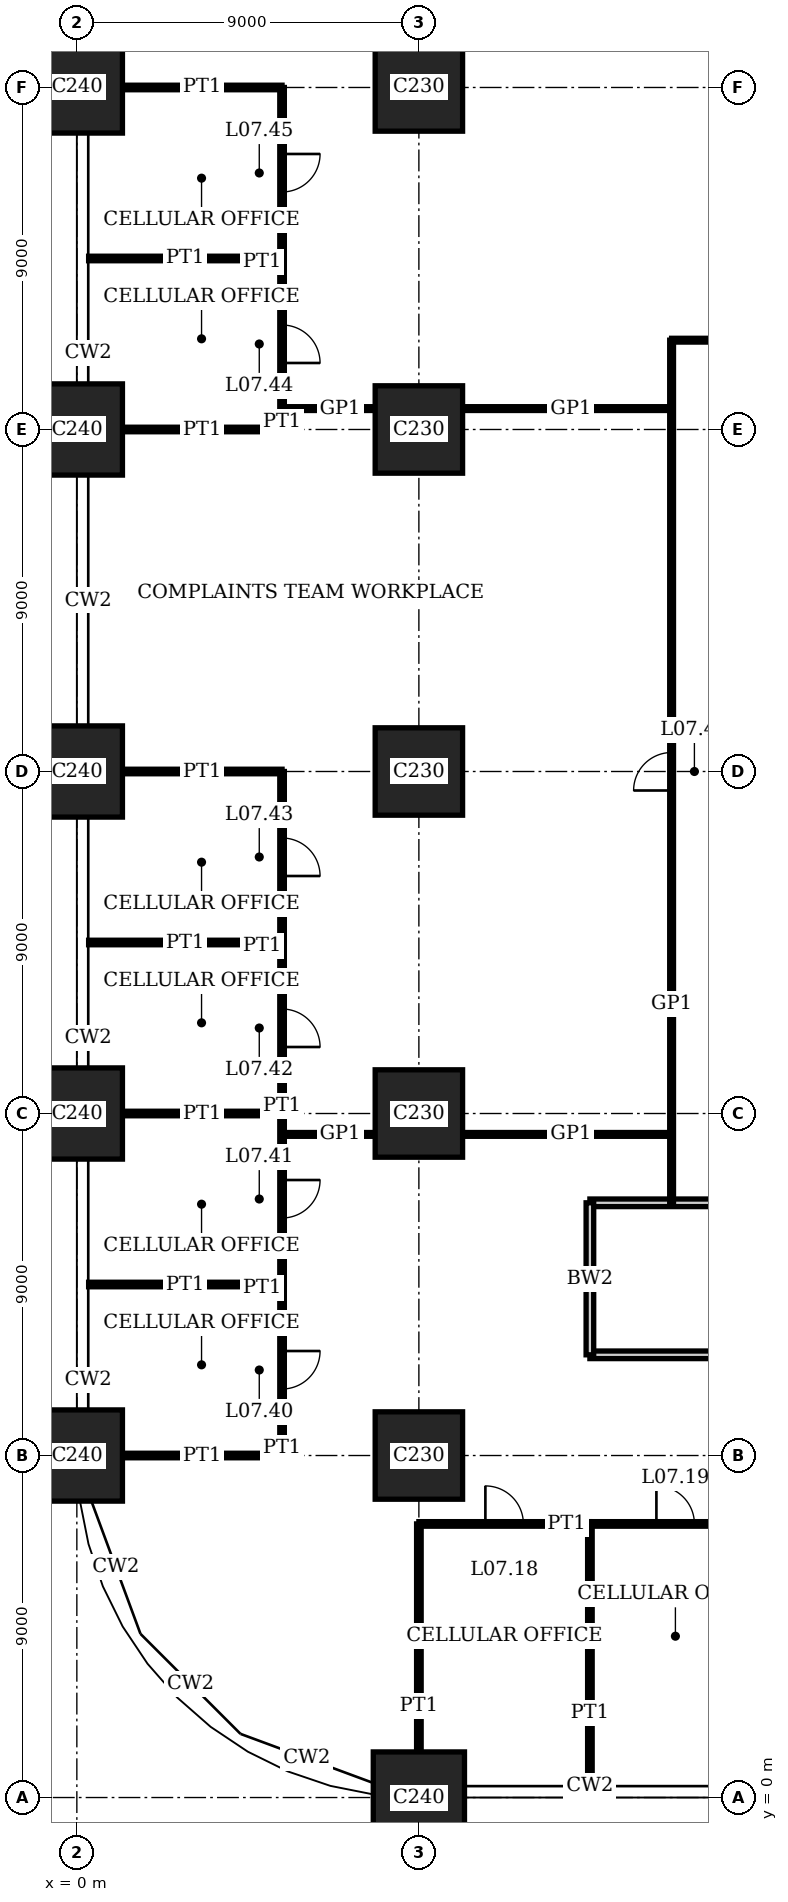
"""IFC4 building model, lengths in metres.
Left out: names, types, materials, properties, quantities, classifications, styles, units other than length and angle.
Written with IfcOpenShell. Run it as: python <this file> out.ifc"""

import sys

from ifc_helpers import new_model, si_unit, direction, frame, frame_2d, origin, origin_2d, place, context, subcontext, project, spatial, rectangle, extrude, element, fill, save


model = new_model("IFC4")
c1 = context("Model", 3, precision=1e-05, world=origin(), true_north=direction((0.0, 1.0)))
c2 = subcontext(c1, "Body", "Model", "MODEL_VIEW")
j1 = project(units=[si_unit("LENGTHUNIT", "METRE"), si_unit("PLANEANGLEUNIT", "RADIAN")], contexts=[c1])
p1 = place(None, origin())
s1 = spatial("IfcSite", under=j1, at=p1, CompositionType="ELEMENT")
p2 = place(p1, origin())
s2 = spatial("IfcBuilding", under=s1, at=p2, CompositionType="ELEMENT")
p3 = place(p2, frame((0.0, 0.0, 31.8)))
s3 = spatial("IfcBuildingStorey", under=s2, at=p3, CompositionType="ELEMENT", Elevation=31.8)
for number, where, z_axis, x_axis in (
    (1, (0.0, 9.0, 0.0), (0.0, 0.0, 1.0), (1.0, 0.0, 0.0)),
    (2, (0.0, 18.0, 0.0), (0.0, 0.0, 1.0), (1.0, 0.0, 0.0)),
    (3, (0.0, 27.0, 0.0), (0.0, 0.0, 1.0), (1.0, 0.0, 0.0)),
    (4, (0.0, 36.0, 0.0), (0.0, 0.0, 1.0), (1.0, 0.0, 0.0)),
    (5, (0.0, 45.0, 0.0), (0.0, 0.0, 1.0), (1.0, 0.0, 0.0)),
    (6, (9.0, 0.0, 0.0), (0.0, 0.0, 1.0), (1.0, 0.0, 0.0)),
):
    element("IfcColumn", number, at=place(p3, frame(where, z_axis=z_axis, x_axis=x_axis)), inside=s3, PredefinedType="COLUMN", context=c2, shape_type="SweptSolid", body=[
        extrude(rectangle(XDim=2.4, YDim=2.4, at=origin_2d()), origin(), (0.0, 0.0, 1.0), 4.0),
    ])
for number, where, z_axis, x_axis in (
    (7, (9.0, 9.0, 0.0), (0.0, 0.0, 1.0), (1.0, 0.0, 0.0)),
    (8, (9.0, 18.0, 0.0), (0.0, 0.0, 1.0), (1.0, 0.0, 0.0)),
    (9, (9.0, 27.0, 0.0), (0.0, 0.0, 1.0), (1.0, 0.0, 0.0)),
    (10, (9.0, 36.0, 0.0), (0.0, 0.0, 1.0), (1.0, 0.0, 0.0)),
    (11, (9.0, 45.0, 0.0), (0.0, 0.0, 1.0), (1.0, 0.0, 0.0)),
):
    element("IfcColumn", number, at=place(p3, frame(where, z_axis=z_axis, x_axis=x_axis)), inside=s3, PredefinedType="COLUMN", context=c2, shape_type="SweptSolid", body=[
        extrude(rectangle(XDim=2.3, YDim=2.3, at=origin_2d()), origin(), (0.0, 0.0, 1.0), 4.0),
    ])
p4 = place(p3, frame((9.0, 7.2, 0.0), z_axis=(0.0, 0.0, 1.0), x_axis=(1.0, 0.0, 0.0)))
e12 = element("IfcWall", 12, at=p4, inside=s3, PredefinedType="PARTITIONING", context=c2, shape_type="SweptSolid", body=[
    extrude(rectangle(XDim=4.5, YDim=0.12, at=frame_2d((2.25, 0.0))), origin(), (0.0, 0.0, 1.0), 3.75),
])
p5 = place(p4, frame((1.75, 0.0, 0.0)))
e13 = element("IfcOpeningElement", 13, at=p5, cuts=e12, PredefinedType="OPENING", context=c2, shape_type="SweptSolid", body=[
    extrude(rectangle(XDim=1.0, YDim=2.4, at=frame_2d((0.5, 1.2))), frame((0.0, 0.07, 0.0), z_axis=(0.0, -1.0, 0.0), x_axis=(1.0, 0.0, 0.0)), (0.0, 0.0, 1.0), 0.14),
])
p6 = place(p3, frame((13.5, 7.2, 0.0), z_axis=(0.0, 0.0, 1.0), x_axis=(1.0, 0.0, 0.0)))
e14 = element("IfcWall", 14, at=p6, inside=s3, PredefinedType="PARTITIONING", context=c2, shape_type="SweptSolid", body=[
    extrude(rectangle(XDim=4.5, YDim=0.12, at=frame_2d((2.25, 0.0))), origin(), (0.0, 0.0, 1.0), 3.75),
])
p7 = place(p6, frame((1.75, 0.0, 0.0)))
e15 = element("IfcOpeningElement", 15, at=p7, cuts=e14, PredefinedType="OPENING", context=c2, shape_type="SweptSolid", body=[
    extrude(rectangle(XDim=1.0, YDim=2.4, at=frame_2d((0.5, 1.2))), frame((0.0, 0.07, 0.0), z_axis=(0.0, -1.0, 0.0), x_axis=(1.0, 0.0, 0.0)), (0.0, 0.0, 1.0), 0.14),
])
p8 = place(p3, frame((1.2, 9.0, 0.0), z_axis=(0.0, 0.0, 1.0), x_axis=(1.0, 0.0, 0.0)))
e16 = element("IfcWall", 16, at=p8, inside=s3, PredefinedType="PARTITIONING", context=c2, shape_type="SweptSolid", body=[
    extrude(rectangle(XDim=4.2, YDim=0.12, at=frame_2d((2.1, 0.0))), origin(), (0.0, 0.0, 1.0), 3.05),
])
p9 = place(p3, frame((13.5, 11.65, 0.0), z_axis=(0.0, 0.0, 1.0), x_axis=(1.0, 0.0, 0.0)))
e17 = element("IfcWall", 17, at=p9, inside=s3, PredefinedType="SOLIDWALL", context=c2, shape_type="SweptSolid", body=[
    extrude(rectangle(XDim=9.0, YDim=0.2, at=frame_2d((4.5, 0.0))), origin(), (0.0, 0.0, 1.0), 3.75),
])
p10 = place(p9, frame((4.0, 0.0, 0.0)))
e18 = element("IfcOpeningElement", 18, at=p10, cuts=e17, PredefinedType="OPENING", context=c2, shape_type="SweptSolid", body=[
    extrude(rectangle(XDim=1.0, YDim=2.4, at=frame_2d((0.5, 1.2))), frame((0.0, 0.11, 0.0), z_axis=(0.0, -1.0, 0.0), x_axis=(1.0, 0.0, 0.0)), (0.0, 0.0, 1.0), 0.22),
])
p11 = place(p3, frame((0.31, 13.5, 0.0), z_axis=(0.0, 0.0, 1.0), x_axis=(1.0, 0.0, 0.0)))
e19 = element("IfcWall", 19, at=p11, inside=s3, PredefinedType="PARTITIONING", context=c2, shape_type="SweptSolid", body=[
    extrude(rectangle(XDim=5.09, YDim=0.12, at=frame_2d((2.545, 0.0))), origin(), (0.0, 0.0, 1.0), 3.1),
])
p12 = place(p3, frame((13.5, 15.65, 0.0), z_axis=(0.0, 0.0, 1.0), x_axis=(1.0, 0.0, 0.0)))
e20 = element("IfcWall", 20, at=p12, inside=s3, PredefinedType="SOLIDWALL", context=c2, shape_type="SweptSolid", body=[
    extrude(rectangle(XDim=9.0, YDim=0.2, at=frame_2d((4.5, 0.0))), origin(), (0.0, 0.0, 1.0), 3.75),
])
p13 = place(p3, frame((5.39, 17.45, 0.0), z_axis=(0.0, 0.0, 1.0), x_axis=(1.0, 0.0, 0.0)))
e21 = element("IfcWall", 21, at=p13, inside=s3, PredefinedType="PARTITIONING", context=c2, shape_type="SweptSolid", body=[
    extrude(rectangle(XDim=2.46, YDim=0.1, at=frame_2d((1.23, 0.0))), origin(), (0.0, 0.0, 1.0), 3.75),
])
p14 = place(p3, frame((10.15, 17.45, 0.0), z_axis=(0.0, 0.0, 1.0), x_axis=(1.0, 0.0, 0.0)))
e22 = element("IfcWall", 22, at=p14, inside=s3, PredefinedType="PARTITIONING", context=c2, shape_type="SweptSolid", body=[
    extrude(rectangle(XDim=5.5, YDim=0.1, at=frame_2d((2.75, 0.0))), origin(), (0.0, 0.0, 1.0), 3.75),
])
p15 = place(p3, frame((1.2, 18.0, 0.0), z_axis=(0.0, 0.0, 1.0), x_axis=(1.0, 0.0, 0.0)))
e23 = element("IfcWall", 23, at=p15, inside=s3, PredefinedType="PARTITIONING", context=c2, shape_type="SweptSolid", body=[
    extrude(rectangle(XDim=4.2, YDim=0.12, at=frame_2d((2.1, 0.0))), origin(), (0.0, 0.0, 1.0), 3.05),
])
p16 = place(p3, frame((0.31, 22.5, 0.0), z_axis=(0.0, 0.0, 1.0), x_axis=(1.0, 0.0, 0.0)))
e24 = element("IfcWall", 24, at=p16, inside=s3, PredefinedType="PARTITIONING", context=c2, shape_type="SweptSolid", body=[
    extrude(rectangle(XDim=5.09, YDim=0.12, at=frame_2d((2.545, 0.0))), origin(), (0.0, 0.0, 1.0), 3.1),
])
for number, where, z_axis, x_axis in (
    (25, (1.2, 27.0, 0.0), (0.0, 0.0, 1.0), (1.0, 0.0, 0.0)),
    (26, (1.2, 36.0, 0.0), (0.0, 0.0, 1.0), (1.0, 0.0, 0.0)),
):
    element("IfcWall", number, at=place(p3, frame(where, z_axis=z_axis, x_axis=x_axis)), inside=s3, PredefinedType="PARTITIONING", context=c2, shape_type="SweptSolid", body=[
        extrude(rectangle(XDim=4.2, YDim=0.12, at=frame_2d((2.1, 0.0))), origin(), (0.0, 0.0, 1.0), 3.05),
    ])
p17 = place(p3, frame((5.39, 36.55, 0.0), z_axis=(0.0, 0.0, 1.0), x_axis=(1.0, 0.0, 0.0)))
e27 = element("IfcWall", 27, at=p17, inside=s3, PredefinedType="PARTITIONING", context=c2, shape_type="SweptSolid", body=[
    extrude(rectangle(XDim=2.46, YDim=0.1, at=frame_2d((1.23, 0.0))), origin(), (0.0, 0.0, 1.0), 3.75),
])
p18 = place(p3, frame((10.15, 36.55, 0.0), z_axis=(0.0, 0.0, 1.0), x_axis=(1.0, 0.0, 0.0)))
e28 = element("IfcWall", 28, at=p18, inside=s3, PredefinedType="PARTITIONING", context=c2, shape_type="SweptSolid", body=[
    extrude(rectangle(XDim=5.5, YDim=0.1, at=frame_2d((2.75, 0.0))), origin(), (0.0, 0.0, 1.0), 3.75),
])
p19 = place(p3, frame((15.65, 38.35, 0.0), z_axis=(0.0, 0.0, 1.0), x_axis=(1.0, 0.0, 0.0)))
e29 = element("IfcWall", 29, at=p19, inside=s3, PredefinedType="PARTITIONING", context=c2, shape_type="SweptSolid", body=[
    extrude(rectangle(XDim=24.85, YDim=0.1, at=frame_2d((12.425, 0.0))), origin(), (0.0, 0.0, 1.0), 3.75),
])
p20 = place(p19, frame((11.925, 0.0, 0.0)))
e30 = element("IfcOpeningElement", 30, at=p20, cuts=e29, PredefinedType="OPENING", context=c2, shape_type="SweptSolid", body=[
    extrude(rectangle(XDim=1.0, YDim=2.4, at=frame_2d((0.5, 1.2))), frame((0.0, 0.06, 0.0), z_axis=(0.0, -1.0, 0.0), x_axis=(1.0, 0.0, 0.0)), (0.0, 0.0, 1.0), 0.12),
])
p21 = place(p3, frame((0.31, 40.5, 0.0), z_axis=(0.0, 0.0, 1.0), x_axis=(1.0, 0.0, 0.0)))
e31 = element("IfcWall", 31, at=p21, inside=s3, PredefinedType="PARTITIONING", context=c2, shape_type="SweptSolid", body=[
    extrude(rectangle(XDim=5.09, YDim=0.12, at=frame_2d((2.545, 0.0))), origin(), (0.0, 0.0, 1.0), 3.1),
])
p22 = place(p3, frame((1.2, 45.0, 0.0), z_axis=(0.0, 0.0, 1.0), x_axis=(1.0, 0.0, 0.0)))
e32 = element("IfcWall", 32, at=p22, inside=s3, PredefinedType="PARTITIONING", context=c2, shape_type="SweptSolid", body=[
    extrude(rectangle(XDim=4.2, YDim=0.12, at=frame_2d((2.1, 0.0))), origin(), (0.0, 0.0, 1.0), 3.05),
])
p23 = place(p3, frame((5.4, 9.0, 0.0), z_axis=(0.0, 0.0, 1.0), x_axis=(0.0, 1.0, 0.0)))
e33 = element("IfcWall", 33, at=p23, inside=s3, PredefinedType="PARTITIONING", context=c2, shape_type="SweptSolid", body=[
    extrude(rectangle(XDim=4.5, YDim=0.12, at=frame_2d((2.25, 0.0))), origin(), (0.0, 0.0, 1.0), 3.75),
])
p24 = place(p23, frame((1.75, 0.0, 0.0)))
e34 = element("IfcOpeningElement", 34, at=p24, cuts=e33, PredefinedType="OPENING", context=c2, shape_type="SweptSolid", body=[
    extrude(rectangle(XDim=1.0, YDim=2.4, at=frame_2d((0.5, 1.2))), frame((0.0, 0.07, 0.0), z_axis=(0.0, -1.0, 0.0), x_axis=(1.0, 0.0, 0.0)), (0.0, 0.0, 1.0), 0.14),
])
p25 = place(p3, frame((5.4, 13.5, 0.0), z_axis=(0.0, 0.0, 1.0), x_axis=(0.0, 1.0, 0.0)))
e35 = element("IfcWall", 35, at=p25, inside=s3, PredefinedType="PARTITIONING", context=c2, shape_type="SweptSolid", body=[
    extrude(rectangle(XDim=4.5, YDim=0.12, at=frame_2d((2.25, 0.0))), origin(), (0.0, 0.0, 1.0), 3.75),
])
p26 = place(p25, frame((1.75, 0.0, 0.0)))
e36 = element("IfcOpeningElement", 36, at=p26, cuts=e35, PredefinedType="OPENING", context=c2, shape_type="SweptSolid", body=[
    extrude(rectangle(XDim=1.0, YDim=2.4, at=frame_2d((0.5, 1.2))), frame((0.0, 0.07, 0.0), z_axis=(0.0, -1.0, 0.0), x_axis=(1.0, 0.0, 0.0)), (0.0, 0.0, 1.0), 0.14),
])
p27 = place(p3, frame((5.4, 18.0, 0.0), z_axis=(0.0, 0.0, 1.0), x_axis=(0.0, 1.0, 0.0)))
e37 = element("IfcWall", 37, at=p27, inside=s3, PredefinedType="PARTITIONING", context=c2, shape_type="SweptSolid", body=[
    extrude(rectangle(XDim=4.5, YDim=0.12, at=frame_2d((2.25, 0.0))), origin(), (0.0, 0.0, 1.0), 3.75),
])
p28 = place(p27, frame((1.75, 0.0, 0.0)))
e38 = element("IfcOpeningElement", 38, at=p28, cuts=e37, PredefinedType="OPENING", context=c2, shape_type="SweptSolid", body=[
    extrude(rectangle(XDim=1.0, YDim=2.4, at=frame_2d((0.5, 1.2))), frame((0.0, 0.07, 0.0), z_axis=(0.0, -1.0, 0.0), x_axis=(1.0, 0.0, 0.0)), (0.0, 0.0, 1.0), 0.14),
])
p29 = place(p3, frame((5.4, 22.5, 0.0), z_axis=(0.0, 0.0, 1.0), x_axis=(0.0, 1.0, 0.0)))
e39 = element("IfcWall", 39, at=p29, inside=s3, PredefinedType="PARTITIONING", context=c2, shape_type="SweptSolid", body=[
    extrude(rectangle(XDim=4.5, YDim=0.12, at=frame_2d((2.25, 0.0))), origin(), (0.0, 0.0, 1.0), 3.75),
])
p30 = place(p29, frame((1.75, 0.0, 0.0)))
e40 = element("IfcOpeningElement", 40, at=p30, cuts=e39, PredefinedType="OPENING", context=c2, shape_type="SweptSolid", body=[
    extrude(rectangle(XDim=1.0, YDim=2.4, at=frame_2d((0.5, 1.2))), frame((0.0, 0.07, 0.0), z_axis=(0.0, -1.0, 0.0), x_axis=(1.0, 0.0, 0.0)), (0.0, 0.0, 1.0), 0.14),
])
p31 = place(p3, frame((5.4, 36.0, 0.0), z_axis=(0.0, 0.0, 1.0), x_axis=(0.0, 1.0, 0.0)))
e41 = element("IfcWall", 41, at=p31, inside=s3, PredefinedType="PARTITIONING", context=c2, shape_type="SweptSolid", body=[
    extrude(rectangle(XDim=4.5, YDim=0.12, at=frame_2d((2.25, 0.0))), origin(), (0.0, 0.0, 1.0), 3.75),
])
p32 = place(p31, frame((1.75, 0.0, 0.0)))
e42 = element("IfcOpeningElement", 42, at=p32, cuts=e41, PredefinedType="OPENING", context=c2, shape_type="SweptSolid", body=[
    extrude(rectangle(XDim=1.0, YDim=2.4, at=frame_2d((0.5, 1.2))), frame((0.0, 0.07, 0.0), z_axis=(0.0, -1.0, 0.0), x_axis=(1.0, 0.0, 0.0)), (0.0, 0.0, 1.0), 0.14),
])
p33 = place(p3, frame((5.4, 40.5, 0.0), z_axis=(0.0, 0.0, 1.0), x_axis=(0.0, 1.0, 0.0)))
e43 = element("IfcWall", 43, at=p33, inside=s3, PredefinedType="PARTITIONING", context=c2, shape_type="SweptSolid", body=[
    extrude(rectangle(XDim=4.5, YDim=0.12, at=frame_2d((2.25, 0.0))), origin(), (0.0, 0.0, 1.0), 3.75),
])
p34 = place(p33, frame((1.75, 0.0, 0.0)))
e44 = element("IfcOpeningElement", 44, at=p34, cuts=e43, PredefinedType="OPENING", context=c2, shape_type="SweptSolid", body=[
    extrude(rectangle(XDim=1.0, YDim=2.4, at=frame_2d((0.5, 1.2))), frame((0.0, 0.07, 0.0), z_axis=(0.0, -1.0, 0.0), x_axis=(1.0, 0.0, 0.0)), (0.0, 0.0, 1.0), 0.14),
])
p35 = place(p3, frame((9.0, 1.2, 0.0), z_axis=(0.0, 0.0, 1.0), x_axis=(0.0, 1.0, 0.0)))
e45 = element("IfcWall", 45, at=p35, inside=s3, PredefinedType="PARTITIONING", context=c2, shape_type="SweptSolid", body=[
    extrude(rectangle(XDim=6.0, YDim=0.12, at=frame_2d((3.0, 0.0))), origin(), (0.0, 0.0, 1.0), 3.05),
])
p36 = place(p3, frame((13.5, 11.65, 0.0), z_axis=(0.0, 0.0, 1.0), x_axis=(0.0, 1.0, 0.0)))
e46 = element("IfcWall", 46, at=p36, inside=s3, PredefinedType="SOLIDWALL", context=c2, shape_type="SweptSolid", body=[
    extrude(rectangle(XDim=4.0, YDim=0.2, at=frame_2d((2.0, 0.0))), origin(), (0.0, 0.0, 1.0), 3.75),
])
p37 = place(p3, frame((13.5, 0.31, 0.0), z_axis=(0.0, 0.0, 1.0), x_axis=(0.0, 1.0, 0.0)))
e47 = element("IfcWall", 47, at=p37, inside=s3, PredefinedType="PARTITIONING", context=c2, shape_type="SweptSolid", body=[
    extrude(rectangle(XDim=6.89, YDim=0.12, at=frame_2d((3.445, 0.0))), origin(), (0.0, 0.0, 1.0), 3.75),
])
p38 = place(p3, frame((15.65, 15.65, 0.0), z_axis=(0.0, 0.0, 1.0), x_axis=(0.0, 1.0, 0.0)))
e48 = element("IfcWall", 48, at=p38, inside=s3, PredefinedType="PARTITIONING", context=c2, shape_type="SweptSolid", body=[
    extrude(rectangle(XDim=22.7, YDim=0.1, at=frame_2d((11.35, 0.0))), origin(), (0.0, 0.0, 1.0), 3.75),
])
p39 = place(p38, frame((10.85, 0.0, 0.0)))
e49 = element("IfcOpeningElement", 49, at=p39, cuts=e48, PredefinedType="OPENING", context=c2, shape_type="SweptSolid", body=[
    extrude(rectangle(XDim=1.0, YDim=2.4, at=frame_2d((0.5, 1.2))), frame((0.0, 0.06, 0.0), z_axis=(0.0, -1.0, 0.0), x_axis=(1.0, 0.0, 0.0)), (0.0, 0.0, 1.0), 0.12),
])
p40 = place(p5, origin())
e50 = element("IfcDoor", 50, at=p40, inside=s3, OperationType="SINGLE_SWING_RIGHT", PredefinedType="DOOR", context=c2, shape_type="SweptSolid", body=[
    extrude(rectangle(XDim=1.0, YDim=2.4, at=frame_2d((0.5, 1.2))), frame((0.0, 0.025, 0.0), z_axis=(0.0, -1.0, 0.0), x_axis=(1.0, 0.0, 0.0)), (0.0, 0.0, 1.0), 0.05),
])
fill(e13, e50)
p41 = place(p7, origin())
e51 = element("IfcDoor", 51, at=p41, inside=s3, OperationType="SINGLE_SWING_RIGHT", PredefinedType="DOOR", context=c2, shape_type="SweptSolid", body=[
    extrude(rectangle(XDim=1.0, YDim=2.4, at=frame_2d((0.5, 1.2))), frame((0.0, 0.025, 0.0), z_axis=(0.0, -1.0, 0.0), x_axis=(1.0, 0.0, 0.0)), (0.0, 0.0, 1.0), 0.05),
])
fill(e15, e51)
p42 = place(p24, origin())
e52 = element("IfcDoor", 52, at=p42, inside=s3, OperationType="SINGLE_SWING_RIGHT", PredefinedType="DOOR", context=c2, shape_type="SweptSolid", body=[
    extrude(rectangle(XDim=1.0, YDim=2.4, at=frame_2d((0.5, 1.2))), frame((0.0, 0.025, 0.0), z_axis=(0.0, -1.0, 0.0), x_axis=(1.0, 0.0, 0.0)), (0.0, 0.0, 1.0), 0.05),
])
fill(e34, e52)
p43 = place(p26, origin())
e53 = element("IfcDoor", 53, at=p43, inside=s3, OperationType="SINGLE_SWING_RIGHT", PredefinedType="DOOR", context=c2, shape_type="SweptSolid", body=[
    extrude(rectangle(XDim=1.0, YDim=2.4, at=frame_2d((0.5, 1.2))), frame((0.0, 0.025, 0.0), z_axis=(0.0, -1.0, 0.0), x_axis=(1.0, 0.0, 0.0)), (0.0, 0.0, 1.0), 0.05),
])
fill(e36, e53)
p44 = place(p28, origin())
e54 = element("IfcDoor", 54, at=p44, inside=s3, OperationType="SINGLE_SWING_LEFT", PredefinedType="DOOR", context=c2, shape_type="SweptSolid", body=[
    extrude(rectangle(XDim=1.0, YDim=2.4, at=frame_2d((0.5, 1.2))), frame((0.0, 0.025, 0.0), z_axis=(0.0, -1.0, 0.0), x_axis=(1.0, 0.0, 0.0)), (0.0, 0.0, 1.0), 0.05),
])
fill(e38, e54)
p45 = place(p30, origin())
e55 = element("IfcDoor", 55, at=p45, inside=s3, OperationType="SINGLE_SWING_LEFT", PredefinedType="DOOR", context=c2, shape_type="SweptSolid", body=[
    extrude(rectangle(XDim=1.0, YDim=2.4, at=frame_2d((0.5, 1.2))), frame((0.0, 0.025, 0.0), z_axis=(0.0, -1.0, 0.0), x_axis=(1.0, 0.0, 0.0)), (0.0, 0.0, 1.0), 0.05),
])
fill(e40, e55)
p46 = place(p32, origin())
e56 = element("IfcDoor", 56, at=p46, inside=s3, OperationType="SINGLE_SWING_LEFT", PredefinedType="DOOR", context=c2, shape_type="SweptSolid", body=[
    extrude(rectangle(XDim=1.0, YDim=2.4, at=frame_2d((0.5, 1.2))), frame((0.0, 0.025, 0.0), z_axis=(0.0, -1.0, 0.0), x_axis=(1.0, 0.0, 0.0)), (0.0, 0.0, 1.0), 0.05),
])
fill(e42, e56)
p47 = place(p34, origin())
e57 = element("IfcDoor", 57, at=p47, inside=s3, OperationType="SINGLE_SWING_RIGHT", PredefinedType="DOOR", context=c2, shape_type="SweptSolid", body=[
    extrude(rectangle(XDim=1.0, YDim=2.4, at=frame_2d((0.5, 1.2))), frame((0.0, 0.025, 0.0), z_axis=(0.0, -1.0, 0.0), x_axis=(1.0, 0.0, 0.0)), (0.0, 0.0, 1.0), 0.05),
])
fill(e44, e57)
p48 = place(p39, origin())
e58 = element("IfcDoor", 58, at=p48, inside=s3, OperationType="SINGLE_SWING_RIGHT", PredefinedType="DOOR", context=c2, shape_type="SweptSolid", body=[
    extrude(rectangle(XDim=1.0, YDim=2.4, at=frame_2d((0.5, 1.2))), frame((0.0, 0.02, 0.0), z_axis=(0.0, -1.0, 0.0), x_axis=(1.0, 0.0, 0.0)), (0.0, 0.0, 1.0), 0.04),
])
fill(e49, e58)
save(model, sys.argv[1])
